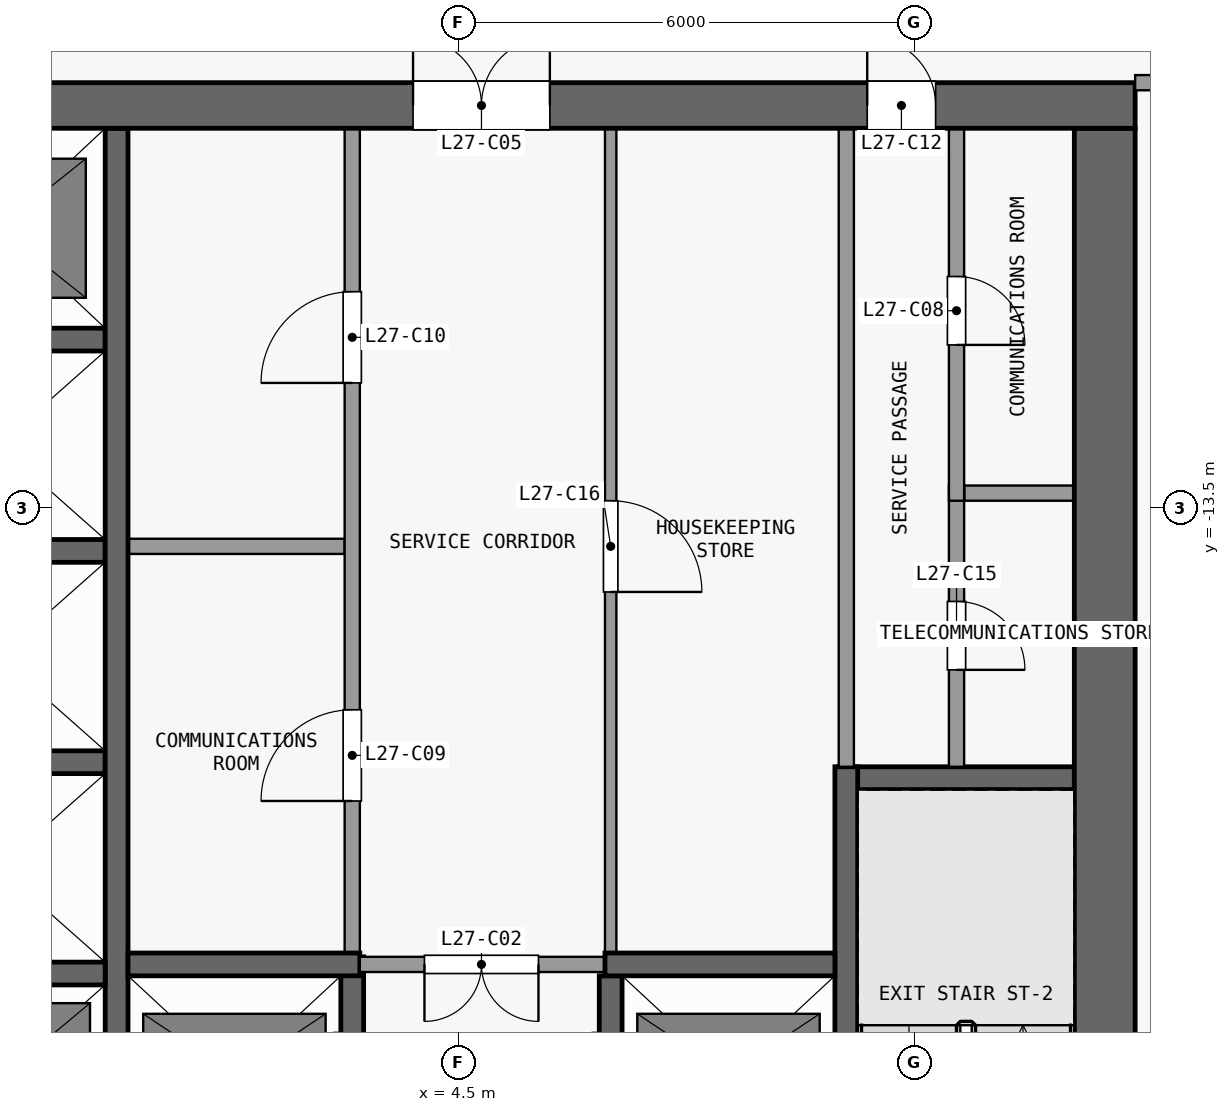
"""IFC4 building model, lengths in metres.
Left out: names, types, materials, properties, quantities, classifications, styles, units other than length and angle.
Written with IfcOpenShell. Run it as: python <this file> out.ifc"""

import sys

from ifc_helpers import new_model, si_unit, direction, frame, frame_2d, origin, place, context, subcontext, project, spatial, rectangle, extrude, element, fill, save


model = new_model("IFC4")
c1 = context("Model", 3, precision=1e-05, world=origin(), true_north=direction((0.0, 1.0)))
c2 = subcontext(c1, "Body", "Model", "MODEL_VIEW")
j1 = project(units=[si_unit("LENGTHUNIT", "METRE"), si_unit("PLANEANGLEUNIT", "RADIAN")], contexts=[c1])
p1 = place(None, origin())
s1 = spatial("IfcSite", under=j1, at=p1, CompositionType="ELEMENT")
p2 = place(p1, origin())
s2 = spatial("IfcBuilding", under=s1, at=p2, CompositionType="ELEMENT")
p3 = place(p2, frame((0.0, 0.0, 109.9)))
s3 = spatial("IfcBuildingStorey", under=s2, at=p3, CompositionType="ELEMENT", Elevation=109.9)
p4 = place(p3, frame((-13.4, -8.2, 0.0), z_axis=(0.0, 0.0, 1.0), x_axis=(1.0, 0.0, 0.0)))
e1 = element("IfcWall", 1, at=p4, inside=s3, PredefinedType="SHEAR", context=c2, shape_type="SweptSolid", body=[
    extrude(rectangle(XDim=26.8, YDim=0.6, at=frame_2d((13.4, 0.0))), origin(), (0.0, 0.0, 1.0), 3.3),
])
p5 = place(p4, frame((7.7, 0.0, 0.0)))
e2 = element("IfcOpeningElement", 2, at=p5, cuts=e1, PredefinedType="OPENING", context=c2, shape_type="SweptSolid", body=[
    extrude(rectangle(XDim=1.8, YDim=2.1, at=frame_2d((0.9, 1.05))), frame((0.0, 0.31, 0.0), z_axis=(0.0, -1.0, 0.0), x_axis=(1.0, 0.0, 0.0)), (0.0, 0.0, 1.0), 0.62),
])
p6 = place(p4, frame((17.3, 0.0, 0.0)))
e3 = element("IfcOpeningElement", 3, at=p6, cuts=e1, PredefinedType="OPENING", context=c2, shape_type="SweptSolid", body=[
    extrude(rectangle(XDim=1.8, YDim=2.1, at=frame_2d((0.9, 1.05))), frame((0.0, 0.31, 0.0), z_axis=(0.0, -1.0, 0.0), x_axis=(1.0, 0.0, 0.0)), (0.0, 0.0, 1.0), 0.62),
])
p7 = place(p4, frame((2.625, 0.0, 0.0)))
e4 = element("IfcOpeningElement", 4, at=p7, cuts=e1, PredefinedType="OPENING", context=c2, shape_type="SweptSolid", body=[
    extrude(rectangle(XDim=0.9, YDim=2.1, at=frame_2d((0.45, 1.05))), frame((0.0, 0.31, 0.0), z_axis=(0.0, -1.0, 0.0), x_axis=(1.0, 0.0, 0.0)), (0.0, 0.0, 1.0), 0.62),
])
p8 = place(p4, frame((23.275, 0.0, 0.0)))
e5 = element("IfcOpeningElement", 5, at=p8, cuts=e1, PredefinedType="OPENING", context=c2, shape_type="SweptSolid", body=[
    extrude(rectangle(XDim=0.9, YDim=2.1, at=frame_2d((0.45, 1.05))), frame((0.0, 0.31, 0.0), z_axis=(0.0, -1.0, 0.0), x_axis=(1.0, 0.0, 0.0)), (0.0, 0.0, 1.0), 0.62),
])
p9 = place(p3, frame((13.0, -24.6, 0.0), z_axis=(0.0, 0.0, 1.0), x_axis=(0.0, 1.0, 0.0)))
e6 = element("IfcWall", 6, at=p9, inside=s3, PredefinedType="SHEAR", context=c2, shape_type="SweptSolid", body=[
    extrude(rectangle(XDim=16.1, YDim=0.8, at=frame_2d((8.05, 0.0))), origin(), (0.0, 0.0, 1.0), 3.3),
])
p10 = place(p3, frame((-2.95, -19.62, 0.0), z_axis=(0.0, 0.0, 1.0), x_axis=(1.0, 0.0, 0.0)))
e7 = element("IfcWall", 7, at=p10, inside=s3, PredefinedType="SHEAR", context=c2, shape_type="SweptSolid", body=[
    extrude(rectangle(XDim=2.8, YDim=0.3, at=frame_2d((1.4, 0.0))), origin(), (0.0, 0.0, 1.0), 3.3),
])
p11 = place(p3, frame((0.15, -19.5, 0.0), z_axis=(0.0, 0.0, 1.0), x_axis=(1.0, 0.0, 0.0)))
e8 = element("IfcWall", 8, at=p11, inside=s3, PredefinedType="SHEAR", context=c2, shape_type="SweptSolid", body=[
    extrude(rectangle(XDim=3.05, YDim=0.3, at=frame_2d((1.525, 0.0))), origin(), (0.0, 0.0, 1.0), 3.3),
])
p12 = place(p3, frame((6.575, -19.5, 0.0), z_axis=(0.0, 0.0, 1.0), x_axis=(-1.0, 0.0, 0.0)))
e9 = element("IfcWall", 9, at=p12, inside=s3, PredefinedType="PARTITIONING", context=c2, shape_type="SweptSolid", body=[
    extrude(rectangle(XDim=3.375, YDim=0.2, at=frame_2d((1.688, 0.0))), origin(), (0.0, 0.0, 1.0), 3.3),
])
p13 = place(p12, frame((1.025, 0.0, 0.0)))
e10 = element("IfcOpeningElement", 10, at=p13, cuts=e9, PredefinedType="OPENING", context=c2, shape_type="SweptSolid", body=[
    extrude(rectangle(XDim=1.5, YDim=2.1, at=frame_2d((0.75, 1.05))), frame((0.0, 0.11, 0.0), z_axis=(0.0, -1.0, 0.0), x_axis=(1.0, 0.0, 0.0)), (0.0, 0.0, 1.0), 0.22),
])
p14 = place(p3, frame((6.425, -19.5, 0.0), z_axis=(0.0, 0.0, 1.0), x_axis=(1.0, 0.0, 0.0)))
e11 = element("IfcWall", 11, at=p14, inside=s3, PredefinedType="SHEAR", context=c2, shape_type="SweptSolid", body=[
    extrude(rectangle(XDim=3.025, YDim=0.3, at=frame_2d((1.512, 0.0))), origin(), (0.0, 0.0, 1.0), 3.3),
])
p15 = place(p3, frame((9.5, -17.05, 0.0), z_axis=(0.0, 0.0, 1.0), x_axis=(1.0, 0.0, 0.0)))
e12 = element("IfcWall", 12, at=p15, inside=s3, PredefinedType="SHEAR", context=c2, shape_type="SweptSolid", body=[
    extrude(rectangle(XDim=3.1, YDim=0.3, at=frame_2d((1.55, 0.0))), origin(), (0.0, 0.0, 1.0), 3.3),
])
for number, where, z_axis, x_axis in (
    (13, (-2.95, -16.84, 0.0), (0.0, 0.0, 1.0), (1.0, 0.0, 0.0)),
    (14, (-2.95, -14.06, 0.0), (0.0, 0.0, 1.0), (1.0, 0.0, 0.0)),
):
    element("IfcWall", number, at=place(p3, frame(where, z_axis=z_axis, x_axis=x_axis)), inside=s3, PredefinedType="SHEAR", context=c2, shape_type="SweptSolid", body=[
        extrude(rectangle(XDim=2.8, YDim=0.3, at=frame_2d((1.4, 0.0))), origin(), (0.0, 0.0, 1.0), 3.3),
    ])
p16 = place(p3, frame((0.15, -14.0, 0.0), z_axis=(0.0, 0.0, 1.0), x_axis=(1.0, 0.0, 0.0)))
e15 = element("IfcWall", 15, at=p16, inside=s3, PredefinedType="PARTITIONING", context=c2, shape_type="SweptSolid", body=[
    extrude(rectangle(XDim=2.85, YDim=0.2, at=frame_2d((1.425, 0.0))), origin(), (0.0, 0.0, 1.0), 3.3),
])
p17 = place(p3, frame((11.15, -13.3, 0.0), z_axis=(0.0, 0.0, 1.0), x_axis=(1.0, 0.0, 0.0)))
e16 = element("IfcWall", 16, at=p17, inside=s3, PredefinedType="PARTITIONING", context=c2, shape_type="SweptSolid", body=[
    extrude(rectangle(XDim=1.45, YDim=0.2, at=frame_2d((0.725, 0.0))), origin(), (0.0, 0.0, 1.0), 3.3),
])
p18 = place(p3, frame((-2.95, -11.28, 0.0), z_axis=(0.0, 0.0, 1.0), x_axis=(1.0, 0.0, 0.0)))
e17 = element("IfcWall", 17, at=p18, inside=s3, PredefinedType="SHEAR", context=c2, shape_type="SweptSolid", body=[
    extrude(rectangle(XDim=2.8, YDim=0.3, at=frame_2d((1.4, 0.0))), origin(), (0.0, 0.0, 1.0), 3.3),
])
p19 = place(p3, frame((0.0, -22.25, 0.0), z_axis=(0.0, 0.0, 1.0), x_axis=(0.0, 1.0, 0.0)))
e18 = element("IfcWall", 18, at=p19, inside=s3, PredefinedType="SHEAR", context=c2, shape_type="SweptSolid", body=[
    extrude(rectangle(XDim=13.75, YDim=0.3, at=frame_2d((6.875, 0.0))), origin(), (0.0, 0.0, 1.0), 3.3),
])
p20 = place(p3, frame((3.1, -22.25, 0.0), z_axis=(0.0, 0.0, 1.0), x_axis=(0.0, 1.0, 0.0)))
e19 = element("IfcWall", 19, at=p20, inside=s3, PredefinedType="SHEAR", context=c2, shape_type="SweptSolid", body=[
    extrude(rectangle(XDim=2.85, YDim=0.3, at=frame_2d((1.425, 0.0))), origin(), (0.0, 0.0, 1.0), 3.3),
])
p21 = place(p20, frame((0.75, 0.0, 0.0)))
e20 = element("IfcOpeningElement", 20, at=p21, cuts=e19, PredefinedType="OPENING", context=c2, shape_type="SweptSolid", body=[
    extrude(rectangle(XDim=1.1, YDim=2.1, at=frame_2d((0.55, 1.05))), frame((0.0, 0.16, 0.0), z_axis=(0.0, -1.0, 0.0), x_axis=(1.0, 0.0, 0.0)), (0.0, 0.0, 1.0), 0.32),
])
p22 = place(p3, frame((3.1, -19.6, 0.0), z_axis=(0.0, 0.0, 1.0), x_axis=(0.0, 1.0, 0.0)))
e21 = element("IfcWall", 21, at=p22, inside=s3, PredefinedType="PARTITIONING", context=c2, shape_type="SweptSolid", body=[
    extrude(rectangle(XDim=11.1, YDim=0.2, at=frame_2d((5.55, 0.0))), origin(), (0.0, 0.0, 1.0), 3.3),
])
p23 = place(p22, frame((2.25, 0.0, 0.0)))
e22 = element("IfcOpeningElement", 22, at=p23, cuts=e21, PredefinedType="OPENING", context=c2, shape_type="SweptSolid", body=[
    extrude(rectangle(XDim=1.2, YDim=2.1, at=frame_2d((0.6, 1.05))), frame((0.0, 0.11, 0.0), z_axis=(0.0, -1.0, 0.0), x_axis=(1.0, 0.0, 0.0)), (0.0, 0.0, 1.0), 0.22),
])
p24 = place(p22, frame((7.75, 0.0, 0.0)))
e23 = element("IfcOpeningElement", 23, at=p24, cuts=e21, PredefinedType="OPENING", context=c2, shape_type="SweptSolid", body=[
    extrude(rectangle(XDim=1.2, YDim=2.1, at=frame_2d((0.6, 1.05))), frame((0.0, 0.11, 0.0), z_axis=(0.0, -1.0, 0.0), x_axis=(1.0, 0.0, 0.0)), (0.0, 0.0, 1.0), 0.22),
])
p25 = place(p3, frame((6.5, -22.25, 0.0), z_axis=(0.0, 0.0, 1.0), x_axis=(0.0, 1.0, 0.0)))
e24 = element("IfcWall", 24, at=p25, inside=s3, PredefinedType="SHEAR", context=c2, shape_type="SweptSolid", body=[
    extrude(rectangle(XDim=2.6, YDim=0.3, at=frame_2d((1.3, 0.0))), origin(), (0.0, 0.0, 1.0), 3.3),
])
p26 = place(p25, frame((0.75, 0.0, 0.0)))
e25 = element("IfcOpeningElement", 25, at=p26, cuts=e24, PredefinedType="OPENING", context=c2, shape_type="SweptSolid", body=[
    extrude(rectangle(XDim=1.1, YDim=2.1, at=frame_2d((0.55, 1.05))), frame((0.0, 0.16, 0.0), z_axis=(0.0, -1.0, 0.0), x_axis=(1.0, 0.0, 0.0)), (0.0, 0.0, 1.0), 0.32),
])
p27 = place(p3, frame((6.5, -8.5, 0.0), z_axis=(0.0, 0.0, 1.0), x_axis=(0.0, -1.0, 0.0)))
e26 = element("IfcWall", 26, at=p27, inside=s3, PredefinedType="PARTITIONING", context=c2, shape_type="SweptSolid", body=[
    extrude(rectangle(XDim=10.85, YDim=0.15, at=frame_2d((5.425, 0.0))), origin(), (0.0, 0.0, 1.0), 3.3),
])
p28 = place(p27, frame((4.9, 0.0, 0.0)))
e27 = element("IfcOpeningElement", 27, at=p28, cuts=e26, PredefinedType="OPENING", context=c2, shape_type="SweptSolid", body=[
    extrude(rectangle(XDim=1.2, YDim=2.1, at=frame_2d((0.6, 1.05))), frame((0.0, 0.085, 0.0), z_axis=(0.0, -1.0, 0.0), x_axis=(1.0, 0.0, 0.0)), (0.0, 0.0, 1.0), 0.17),
])
p29 = place(p3, frame((9.6, -16.9, 0.0), z_axis=(0.0, 0.0, 1.0), x_axis=(0.0, -1.0, 0.0)))
e28 = element("IfcWall", 28, at=p29, inside=s3, PredefinedType="SHEAR", context=c2, shape_type="SweptSolid", body=[
    extrude(rectangle(XDim=7.7, YDim=0.3, at=frame_2d((3.85, 0.0))), origin(), (0.0, 0.0, 1.0), 3.3),
])
p30 = place(p29, frame((6.5, 0.0, 0.0)))
e29 = element("IfcOpeningElement", 29, at=p30, cuts=e28, PredefinedType="OPENING", context=c2, shape_type="SweptSolid", body=[
    extrude(rectangle(XDim=1.1, YDim=2.1, at=frame_2d((0.55, 1.05))), frame((0.0, 0.16, 0.0), z_axis=(0.0, -1.0, 0.0), x_axis=(1.0, 0.0, 0.0)), (0.0, 0.0, 1.0), 0.32),
])
p31 = place(p3, frame((9.6, -16.9, 0.0), z_axis=(0.0, 0.0, 1.0), x_axis=(0.0, 1.0, 0.0)))
e30 = element("IfcWall", 30, at=p31, inside=s3, PredefinedType="PARTITIONING", context=c2, shape_type="SweptSolid", body=[
    extrude(rectangle(XDim=8.4, YDim=0.2, at=frame_2d((4.2, 0.0))), origin(), (0.0, 0.0, 1.0), 3.3),
])
p32 = place(p3, frame((11.05, -13.2, 0.0), z_axis=(0.0, 0.0, 1.0), x_axis=(0.0, -1.0, 0.0)))
e31 = element("IfcWall", 31, at=p32, inside=s3, PredefinedType="PARTITIONING", context=c2, shape_type="SweptSolid", body=[
    extrude(rectangle(XDim=3.7, YDim=0.2, at=frame_2d((1.85, 0.0))), origin(), (0.0, 0.0, 1.0), 3.3),
])
p33 = place(p32, frame((1.525, 0.0, 0.0)))
e32 = element("IfcOpeningElement", 32, at=p33, cuts=e31, PredefinedType="OPENING", context=c2, shape_type="SweptSolid", body=[
    extrude(rectangle(XDim=0.9, YDim=2.1, at=frame_2d((0.45, 1.05))), frame((0.0, 0.11, 0.0), z_axis=(0.0, -1.0, 0.0), x_axis=(1.0, 0.0, 0.0)), (0.0, 0.0, 1.0), 0.22),
])
p34 = place(p3, frame((11.05, -8.5, 0.0), z_axis=(0.0, 0.0, 1.0), x_axis=(0.0, -1.0, 0.0)))
e33 = element("IfcWall", 33, at=p34, inside=s3, PredefinedType="PARTITIONING", context=c2, shape_type="SweptSolid", body=[
    extrude(rectangle(XDim=4.9, YDim=0.2, at=frame_2d((2.45, 0.0))), origin(), (0.0, 0.0, 1.0), 3.3),
])
p35 = place(p34, frame((1.95, 0.0, 0.0)))
e34 = element("IfcOpeningElement", 34, at=p35, cuts=e33, PredefinedType="OPENING", context=c2, shape_type="SweptSolid", body=[
    extrude(rectangle(XDim=0.9, YDim=2.1, at=frame_2d((0.45, 1.05))), frame((0.0, 0.11, 0.0), z_axis=(0.0, -1.0, 0.0), x_axis=(1.0, 0.0, 0.0)), (0.0, 0.0, 1.0), 0.22),
])
p36 = place(p3, frame((13.4, -7.9, 0.0), z_axis=(0.0, 0.0, 1.0), x_axis=(1.0, 0.0, 0.0)))
e35 = element("IfcWall", 35, at=p36, inside=s3, PredefinedType="PARTITIONING", context=c2, shape_type="SweptSolid", body=[
    extrude(rectangle(XDim=12.75, YDim=0.2, at=frame_2d((6.375, 0.0))), origin(), (0.0, 0.0, 1.0), 3.3),
])
p37 = place(p36, frame((1.0, 0.0, 0.0)))
e36 = element("IfcOpeningElement", 36, at=p37, cuts=e35, PredefinedType="OPENING", context=c2, shape_type="SweptSolid", body=[
    extrude(rectangle(XDim=1.0, YDim=2.1, at=frame_2d((0.5, 1.05))), frame((0.0, 0.11, 0.0), z_axis=(0.0, -1.0, 0.0), x_axis=(1.0, 0.0, 0.0)), (0.0, 0.0, 1.0), 0.22),
])
p38 = place(p13, origin())
e37 = element("IfcDoor", 37, at=p38, inside=s3, OperationType="DOUBLE_DOOR_SINGLE_SWING", PredefinedType="DOOR", context=c2, shape_type="SweptSolid", body=[
    extrude(rectangle(XDim=1.5, YDim=2.1, at=frame_2d((0.75, 1.05))), frame((0.0, 0.025, 0.0), z_axis=(0.0, -1.0, 0.0), x_axis=(1.0, 0.0, 0.0)), (0.0, 0.0, 1.0), 0.05),
])
fill(e10, e37)
p39 = place(p6, origin())
e38 = element("IfcDoor", 38, at=p39, inside=s3, OperationType="DOUBLE_DOOR_SINGLE_SWING", PredefinedType="DOOR", context=c2, shape_type="SweptSolid", body=[
    extrude(rectangle(XDim=1.8, YDim=2.1, at=frame_2d((0.9, 1.05))), frame((0.0, 0.025, 0.0), z_axis=(0.0, -1.0, 0.0), x_axis=(1.0, 0.0, 0.0)), (0.0, 0.0, 1.0), 0.05),
])
fill(e3, e38)
p40 = place(p35, origin())
e39 = element("IfcDoor", 39, at=p40, inside=s3, OperationType="SINGLE_SWING_RIGHT", PredefinedType="DOOR", context=c2, shape_type="SweptSolid", body=[
    extrude(rectangle(XDim=0.9, YDim=2.1, at=frame_2d((0.45, 1.05))), frame((0.0, 0.025, 0.0), z_axis=(0.0, -1.0, 0.0), x_axis=(1.0, 0.0, 0.0)), (0.0, 0.0, 1.0), 0.05),
])
fill(e34, e39)
p41 = place(p23, origin())
e40 = element("IfcDoor", 40, at=p41, inside=s3, OperationType="SINGLE_SWING_LEFT", PredefinedType="DOOR", context=c2, shape_type="SweptSolid", body=[
    extrude(rectangle(XDim=1.2, YDim=2.1, at=frame_2d((0.6, 1.05))), frame((0.0, 0.025, 0.0), z_axis=(0.0, -1.0, 0.0), x_axis=(1.0, 0.0, 0.0)), (0.0, 0.0, 1.0), 0.05),
])
fill(e22, e40)
p42 = place(p24, origin())
e41 = element("IfcDoor", 41, at=p42, inside=s3, OperationType="SINGLE_SWING_LEFT", PredefinedType="DOOR", context=c2, shape_type="SweptSolid", body=[
    extrude(rectangle(XDim=1.2, YDim=2.1, at=frame_2d((0.6, 1.05))), frame((0.0, 0.025, 0.0), z_axis=(0.0, -1.0, 0.0), x_axis=(1.0, 0.0, 0.0)), (0.0, 0.0, 1.0), 0.05),
])
fill(e23, e41)
p43 = place(p8, origin())
e42 = element("IfcDoor", 42, at=p43, inside=s3, OperationType="SINGLE_SWING_LEFT", PredefinedType="DOOR", context=c2, shape_type="SweptSolid", body=[
    extrude(rectangle(XDim=0.9, YDim=2.1, at=frame_2d((0.45, 1.05))), frame((0.0, 0.025, 0.0), z_axis=(0.0, -1.0, 0.0), x_axis=(1.0, 0.0, 0.0)), (0.0, 0.0, 1.0), 0.05),
])
fill(e5, e42)
p44 = place(p33, origin())
e43 = element("IfcDoor", 43, at=p44, inside=s3, OperationType="SINGLE_SWING_RIGHT", PredefinedType="DOOR", context=c2, shape_type="SweptSolid", body=[
    extrude(rectangle(XDim=0.9, YDim=2.1, at=frame_2d((0.45, 1.05))), frame((0.0, 0.025, 0.0), z_axis=(0.0, -1.0, 0.0), x_axis=(1.0, 0.0, 0.0)), (0.0, 0.0, 1.0), 0.05),
])
fill(e32, e43)
p45 = place(p28, origin())
e44 = element("IfcDoor", 44, at=p45, inside=s3, OperationType="SINGLE_SWING_RIGHT", PredefinedType="DOOR", context=c2, shape_type="SweptSolid", body=[
    extrude(rectangle(XDim=1.2, YDim=2.1, at=frame_2d((0.6, 1.05))), frame((0.0, 0.025, 0.0), z_axis=(0.0, -1.0, 0.0), x_axis=(1.0, 0.0, 0.0)), (0.0, 0.0, 1.0), 0.05),
])
fill(e27, e44)
save(model, sys.argv[1])
